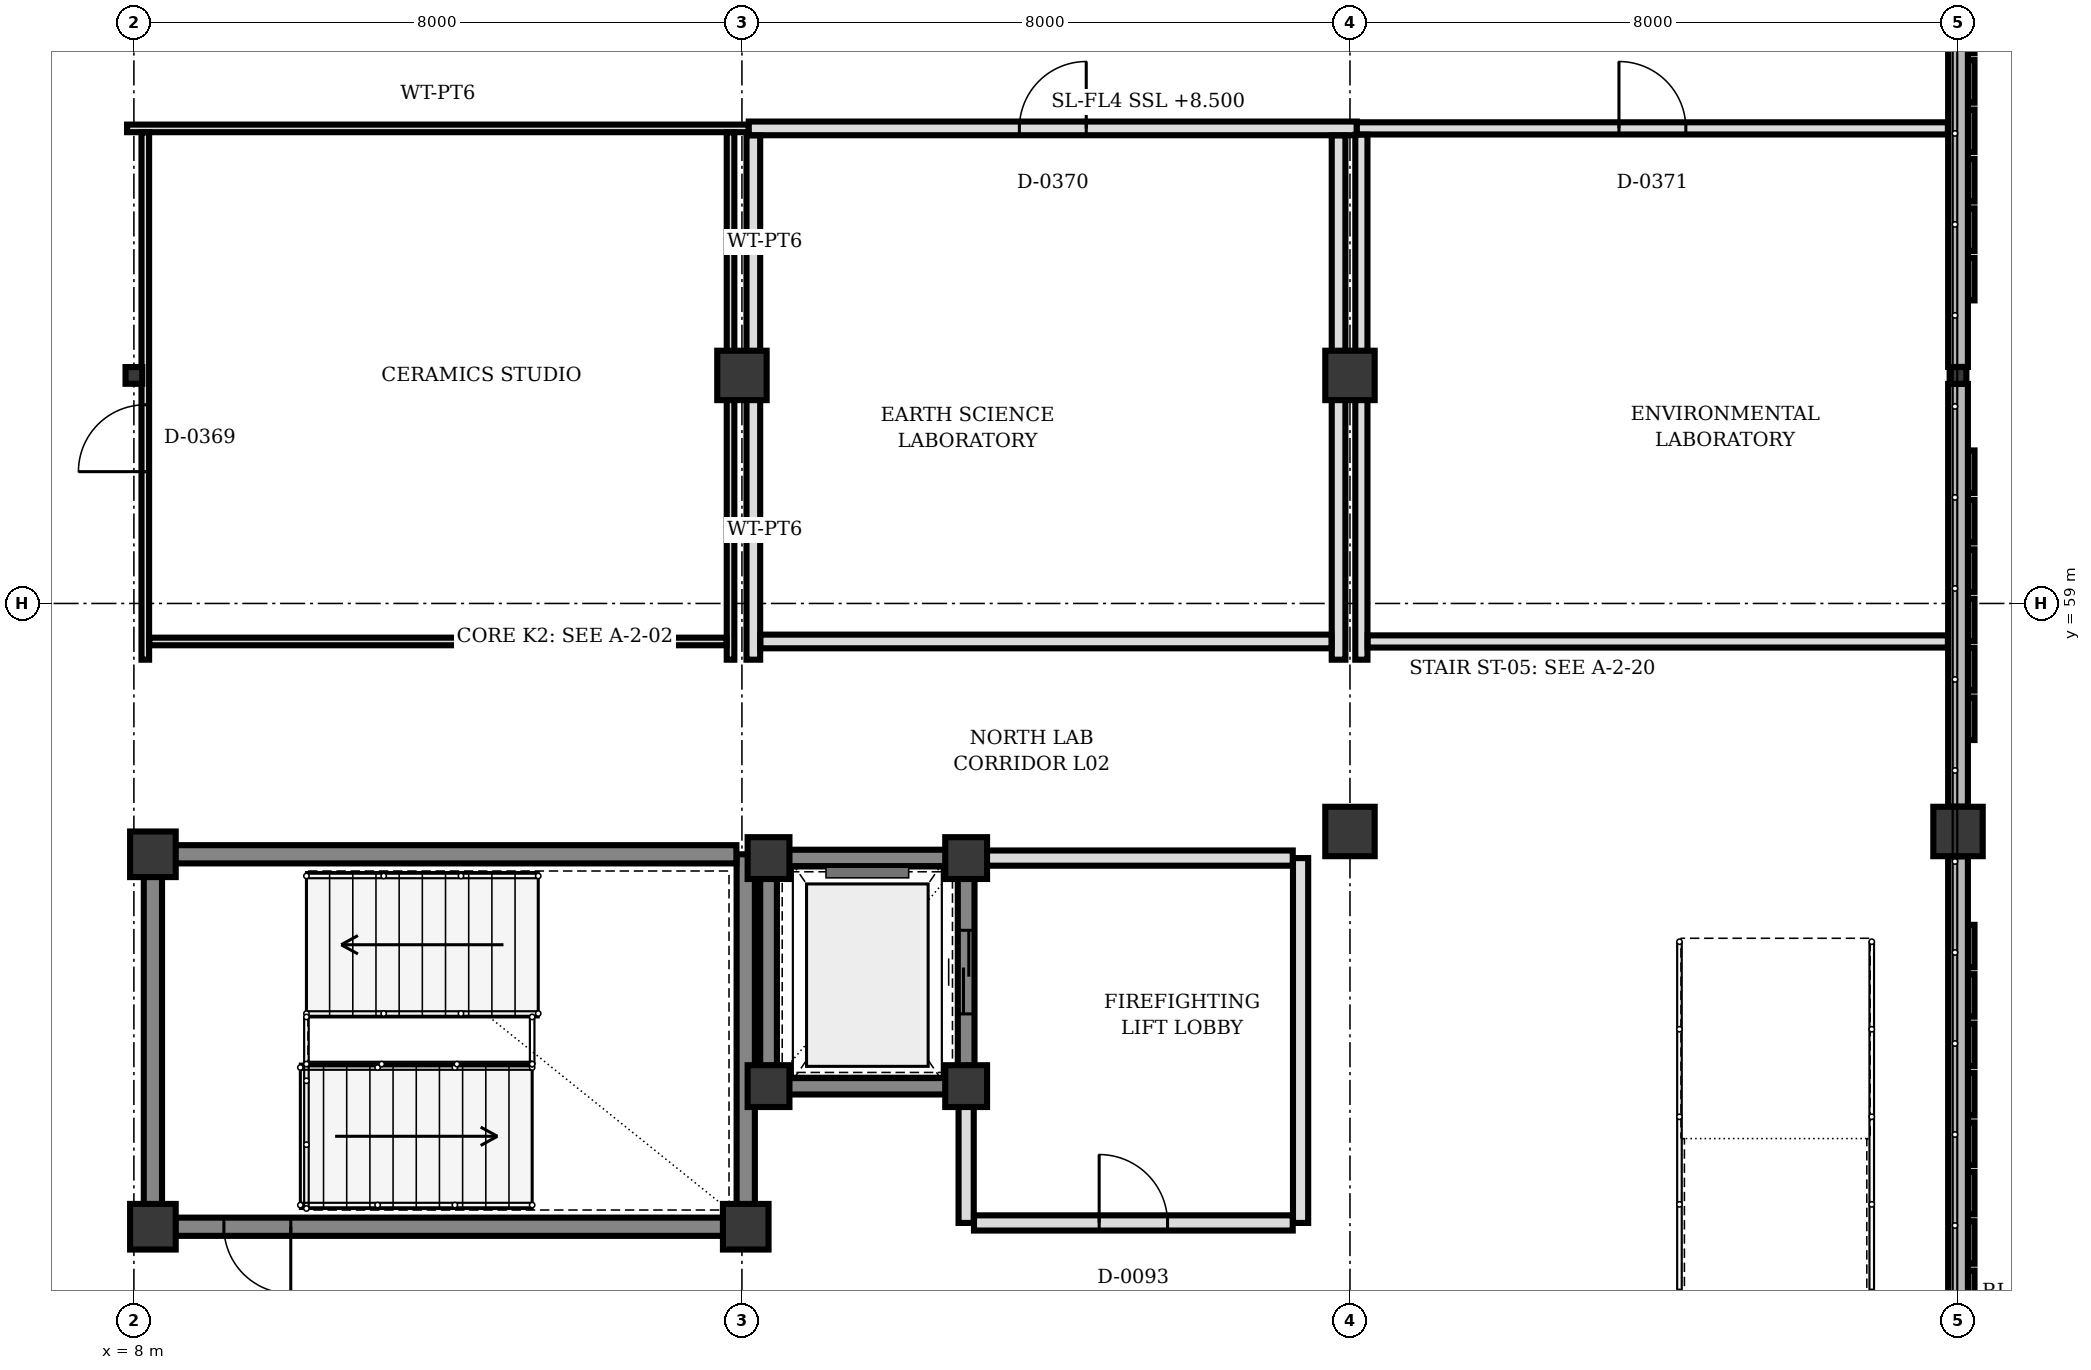
"""IFC4 building model, lengths in metres.
Left out: names, types, materials, properties, quantities, classifications, styles, units other than length and angle.
Written with IfcOpenShell. Run it as: python <this file> out.ifc"""

import sys

from ifc_helpers import new_model, si_unit, direction, frame, frame_2d, origin, origin_2d, place, context, subcontext, project, spatial, rectangle, hollow_rectangle, extrude, element, fill, save


model = new_model("IFC4")
c1 = context("Model", 3, precision=1e-05, world=origin(), true_north=direction((0.0, 1.0)))
c2 = subcontext(c1, "Body", "Model", "MODEL_VIEW")
j1 = project(units=[si_unit("LENGTHUNIT", "METRE"), si_unit("PLANEANGLEUNIT", "RADIAN")], contexts=[c1])
p1 = place(None, origin())
s1 = spatial("IfcSite", under=j1, at=p1, CompositionType="ELEMENT")
p2 = place(p1, origin())
s2 = spatial("IfcBuilding", under=s1, at=p2, CompositionType="ELEMENT")
p3 = place(p2, frame((0.0, 0.0, 8.5)))
s3 = spatial("IfcBuildingStorey", under=s2, at=p3, CompositionType="ELEMENT", Elevation=8.5)
for number, where, z_axis, x_axis in (
    (1, (8.25, 50.8, 0.0), (0.0, 0.0, 1.0), (1.0, 0.0, 0.0)),
    (2, (16.05, 50.8, 0.0), (0.0, 0.0, 1.0), (1.0, 0.0, 0.0)),
    (3, (8.25, 55.7, 0.0), (0.0, 0.0, 1.0), (1.0, 0.0, 0.0)),
):
    element("IfcColumn", number, at=place(p3, frame(where, z_axis=z_axis, x_axis=x_axis)), inside=s3, PredefinedType="COLUMN", context=c2, shape_type="SweptSolid", body=[
        extrude(rectangle(XDim=0.6, YDim=0.6, at=origin_2d()), origin(), (0.0, 0.0, 1.0), 4.0),
    ])
for number, where, z_axis, x_axis in (
    (4, (16.35, 52.65, 0.0), (0.0, 0.0, 1.0), (1.0, 0.0, 0.0)),
    (5, (18.95, 52.65, 0.0), (0.0, 0.0, 1.0), (1.0, 0.0, 0.0)),
    (6, (18.95, 55.65, 0.0), (0.0, 0.0, 1.0), (1.0, 0.0, 0.0)),
    (7, (16.35, 55.65, 0.0), (0.0, 0.0, 1.0), (1.0, 0.0, 0.0)),
):
    element("IfcColumn", number, at=place(p3, frame(where, z_axis=z_axis, x_axis=x_axis)), inside=s3, PredefinedType="COLUMN", context=c2, shape_type="SweptSolid", body=[
        extrude(rectangle(XDim=0.55, YDim=0.55, at=origin_2d()), origin(), (0.0, 0.0, 1.0), 4.0),
    ])
for number, where, z_axis, x_axis in (
    (8, (16.0, 62.0, 0.0), (0.0, 0.0, 1.0), (1.0, 0.0, 0.0)),
    (9, (24.0, 56.0, 0.0), (0.0, 0.0, 1.0), (1.0, 0.0, 0.0)),
    (10, (24.0, 62.0, 0.0), (0.0, 0.0, 1.0), (1.0, 0.0, 0.0)),
    (11, (32.0, 56.0, 0.0), (0.0, 0.0, 1.0), (1.0, 0.0, 0.0)),
):
    element("IfcColumn", number, at=place(p3, frame(where, z_axis=z_axis, x_axis=x_axis)), inside=s3, PredefinedType="COLUMN", context=c2, shape_type="SweptSolid", body=[
        extrude(rectangle(XDim=0.65, YDim=0.65, at=origin_2d()), origin(), (0.0, 0.0, 1.0), 4.0),
    ])
for number, where, z_axis, x_axis in (
    (12, (32.0, 62.0, 0.0), (0.0, 0.0, 1.0), (1.0, 0.0, 0.0)),
    (13, (8.0, 62.0, 0.0), (0.0, 0.0, 1.0), (1.0, 0.0, 0.0)),
):
    element("IfcColumn", number, at=place(p3, frame(where, z_axis=z_axis, x_axis=x_axis)), inside=s3, PredefinedType="COLUMN", context=c2, shape_type="SweptSolid", body=[
        extrude(hollow_rectangle(XDim=0.22, YDim=0.22, WallThickness=0.01, at=origin_2d()), origin(), (0.0, 0.0, 1.0), 4.0),
    ])
for number, where, z_axis, x_axis in (
    (14, (32.0, 67.673, 0.0), (0.0, 0.0, 1.0), (0.0, -1.0, 0.0)),
    (15, (32.0, 61.888, 0.0), (0.0, 0.0, 1.0), (0.0, -1.0, 0.0)),
):
    element("IfcWall", number, at=place(p3, frame(where, z_axis=z_axis, x_axis=x_axis)), inside=s3, PredefinedType="SOLIDWALL", context=c2, shape_type="SweptSolid", body=[
        extrude(rectangle(XDim=5.561, YDim=0.26, at=frame_2d((2.781, 0.0))), origin(), (0.0, 0.0, 1.0), 3.002),
    ])
p4 = place(p3, frame((32.0, 55.673, 0.0), z_axis=(0.0, 0.0, 1.0), x_axis=(0.0, -1.0, 0.0)))
e16 = element("IfcWall", 16, at=p4, inside=s3, PredefinedType="SOLIDWALL", context=c2, shape_type="SweptSolid", body=[
    extrude(rectangle(XDim=7.561, YDim=0.26, at=frame_2d((3.781, 0.0))), origin(), (0.0, 0.0, 1.0), 3.152),
])
p5 = place(p3, frame((8.25, 51.092, 0.0), z_axis=(0.0, 0.0, 1.0), x_axis=(0.0, 1.0, 0.0)))
e17 = element("IfcWall", 17, at=p5, inside=s3, PredefinedType="SHEAR", context=c2, shape_type="SweptSolid", body=[
    extrude(rectangle(XDim=4.316, YDim=0.24, at=frame_2d((2.158, 0.0))), origin(), (0.0, 0.0, 1.0), 3.74),
])
p6 = place(p3, frame((16.05, 55.7, 0.0), z_axis=(0.0, 0.0, 1.0), x_axis=(0.0, -1.0, 0.0)))
e18 = element("IfcWall", 18, at=p6, inside=s3, PredefinedType="SHEAR", context=c2, shape_type="SweptSolid", body=[
    extrude(rectangle(XDim=4.608, YDim=0.24, at=frame_2d((2.304, 0.0))), origin(), (0.0, 0.0, 1.0), 3.74),
])
p7 = place(p3, frame((15.758, 50.8, 0.0), z_axis=(0.0, 0.0, 1.0), x_axis=(-1.0, 0.0, 0.0)))
e19 = element("IfcWall", 19, at=p7, inside=s3, PredefinedType="SHEAR", context=c2, shape_type="SweptSolid", body=[
    extrude(rectangle(XDim=7.216, YDim=0.24, at=frame_2d((3.608, 0.0))), origin(), (0.0, 0.0, 1.0), 3.74),
])
p8 = place(p7, frame((5.694, 0.0, 0.0)))
e20 = element("IfcOpeningElement", 20, at=p8, cuts=e19, PredefinedType="OPENING", context=c2, shape_type="SweptSolid", body=[
    extrude(rectangle(XDim=0.88, YDim=2.1, at=frame_2d((0.44, 1.05))), frame((0.0, 0.13, 0.0), z_axis=(0.0, -1.0, 0.0), x_axis=(1.0, 0.0, 0.0)), (0.0, 0.0, 1.0), 0.26),
])
p9 = place(p3, frame((15.927, 55.7, 0.0), z_axis=(0.0, 0.0, 1.0), x_axis=(-1.0, 0.0, 0.0)))
e21 = element("IfcWall", 21, at=p9, inside=s3, PredefinedType="SHEAR", context=c2, shape_type="SweptSolid", body=[
    extrude(rectangle(XDim=7.385, YDim=0.24, at=frame_2d((3.692, 0.0))), origin(), (0.0, 0.0, 1.0), 3.74),
])
p10 = place(p3, frame((16.617, 52.65, 0.0), z_axis=(0.0, 0.0, 1.0), x_axis=(1.0, 0.0, 0.0)))
e22 = element("IfcWall", 22, at=p10, inside=s3, PredefinedType="SHEAR", context=c2, shape_type="SweptSolid", body=[
    extrude(rectangle(XDim=2.066, YDim=0.22, at=frame_2d((1.033, 0.0))), origin(), (0.0, 0.0, 1.0), 3.74),
])
p11 = place(p3, frame((18.95, 52.917, 0.0), z_axis=(0.0, 0.0, 1.0), x_axis=(0.0, 1.0, 0.0)))
e23 = element("IfcWall", 23, at=p11, inside=s3, PredefinedType="SHEAR", context=c2, shape_type="SweptSolid", body=[
    extrude(rectangle(XDim=2.466, YDim=0.22, at=frame_2d((1.233, 0.0))), origin(), (0.0, 0.0, 1.0), 3.74),
])
p12 = place(p11, frame((0.683, 0.0, 0.0)))
e24 = element("IfcOpeningElement", 24, at=p12, cuts=e23, PredefinedType="OPENING", context=c2, shape_type="SweptSolid", body=[
    extrude(rectangle(XDim=1.1, YDim=2.15, at=frame_2d((0.55, 1.075))), frame((0.0, 0.12, 0.0), z_axis=(0.0, -1.0, 0.0), x_axis=(1.0, 0.0, 0.0)), (0.0, 0.0, 1.0), 0.24),
])
p13 = place(p3, frame((18.683, 55.65, 0.0), z_axis=(0.0, 0.0, 1.0), x_axis=(-1.0, 0.0, 0.0)))
e25 = element("IfcWall", 25, at=p13, inside=s3, PredefinedType="SHEAR", context=c2, shape_type="SweptSolid", body=[
    extrude(rectangle(XDim=2.066, YDim=0.22, at=frame_2d((1.033, 0.0))), origin(), (0.0, 0.0, 1.0), 3.74),
])
p14 = place(p3, frame((16.35, 55.383, 0.0), z_axis=(0.0, 0.0, 1.0), x_axis=(0.0, -1.0, 0.0)))
e26 = element("IfcWall", 26, at=p14, inside=s3, PredefinedType="SHEAR", context=c2, shape_type="SweptSolid", body=[
    extrude(rectangle(XDim=2.466, YDim=0.22, at=frame_2d((1.233, 0.0))), origin(), (0.0, 0.0, 1.0), 3.74),
])
p15 = place(p3, frame((18.95, 50.85, 0.0), z_axis=(0.0, 0.0, 1.0), x_axis=(0.0, 1.0, 0.0)))
e27 = element("IfcWall", 27, at=p15, inside=s3, PredefinedType="PARTITIONING", context=c2, shape_type="SweptSolid", body=[
    extrude(rectangle(XDim=1.533, YDim=0.2, at=frame_2d((0.767, 0.0))), origin(), (0.0, 0.0, 1.0), 3.7),
])
p16 = place(p3, frame((23.35, 50.85, 0.0), z_axis=(0.0, 0.0, 1.0), x_axis=(0.0, 1.0, 0.0)))
e28 = element("IfcWall", 28, at=p16, inside=s3, PredefinedType="PARTITIONING", context=c2, shape_type="SweptSolid", body=[
    extrude(rectangle(XDim=4.8, YDim=0.2, at=frame_2d((2.4, 0.0))), origin(), (0.0, 0.0, 1.0), 3.7),
])
p17 = place(p3, frame((19.217, 55.65, 0.0), z_axis=(0.0, 0.0, 1.0), x_axis=(1.0, 0.0, 0.0)))
e29 = element("IfcWall", 29, at=p17, inside=s3, PredefinedType="PARTITIONING", context=c2, shape_type="SweptSolid", body=[
    extrude(rectangle(XDim=4.03, YDim=0.2, at=frame_2d((2.015, 0.0))), origin(), (0.0, 0.0, 1.0), 3.7),
])
p18 = place(p3, frame((19.053, 50.85, 0.0), z_axis=(0.0, 0.0, 1.0), x_axis=(1.0, 0.0, 0.0)))
e30 = element("IfcWall", 30, at=p18, inside=s3, PredefinedType="PARTITIONING", context=c2, shape_type="SweptSolid", body=[
    extrude(rectangle(XDim=4.194, YDim=0.2, at=frame_2d((2.097, 0.0))), origin(), (0.0, 0.0, 1.0), 3.7),
])
p19 = place(p18, frame((1.647, 0.0, 0.0)))
e31 = element("IfcOpeningElement", 31, at=p19, cuts=e30, PredefinedType="OPENING", context=c2, shape_type="SweptSolid", body=[
    extrude(rectangle(XDim=0.9, YDim=2.2, at=frame_2d((0.45, 1.1))), frame((0.0, 0.11, 0.0), z_axis=(0.0, -1.0, 0.0), x_axis=(1.0, 0.0, 0.0)), (0.0, 0.0, 1.0), 0.22),
])
p20 = place(p3, frame((7.91, 65.25, 0.0), z_axis=(0.0, 0.0, 1.0), x_axis=(1.0, 0.0, 0.0)))
e32 = element("IfcWall", 32, at=p20, inside=s3, PredefinedType="PARTITIONING", context=c2, shape_type="SweptSolid", body=[
    extrude(rectangle(XDim=8.18, YDim=0.1, at=frame_2d((4.09, 0.0))), origin(), (0.0, 0.0, 1.0), 3.152),
])
p21 = place(p3, frame((15.85, 65.197, 0.0), z_axis=(0.0, 0.0, 1.0), x_axis=(0.0, -1.0, 0.0)))
e33 = element("IfcWall", 33, at=p21, inside=s3, PredefinedType="PARTITIONING", context=c2, shape_type="SweptSolid", body=[
    extrude(rectangle(XDim=2.88, YDim=0.1, at=frame_2d((1.44, 0.0))), origin(), (0.0, 0.0, 1.0), 3.002),
])
p22 = place(p3, frame((15.85, 61.683, 0.0), z_axis=(0.0, 0.0, 1.0), x_axis=(0.0, -1.0, 0.0)))
e34 = element("IfcWall", 34, at=p22, inside=s3, PredefinedType="PARTITIONING", context=c2, shape_type="SweptSolid", body=[
    extrude(rectangle(XDim=3.423, YDim=0.1, at=frame_2d((1.711, 0.0))), origin(), (0.0, 0.0, 1.0), 3.002),
])
p23 = place(p3, frame((8.15, 58.26, 0.0), z_axis=(0.0, 0.0, 1.0), x_axis=(0.0, 1.0, 0.0)))
e35 = element("IfcWall", 35, at=p23, inside=s3, PredefinedType="PARTITIONING", context=c2, shape_type="SweptSolid", body=[
    extrude(rectangle(XDim=6.937, YDim=0.1, at=frame_2d((3.469, 0.0))), origin(), (0.0, 0.0, 1.0), 3.002),
])
p24 = place(p23, frame((2.474, 0.0, 0.0)))
e36 = element("IfcOpeningElement", 36, at=p24, cuts=e35, PredefinedType="OPENING", context=c2, shape_type="SweptSolid", body=[
    extrude(rectangle(XDim=0.88, YDim=2.1, at=frame_2d((0.44, 1.05))), frame((0.0, 0.06, 0.0), z_axis=(0.0, -1.0, 0.0), x_axis=(1.0, 0.0, 0.0)), (0.0, 0.0, 1.0), 0.12),
])
p25 = place(p3, frame((15.797, 58.5, 0.0), z_axis=(0.0, 0.0, 1.0), x_axis=(-1.0, 0.0, 0.0)))
e37 = element("IfcWall", 37, at=p25, inside=s3, PredefinedType="PARTITIONING", context=c2, shape_type="SweptSolid", body=[
    extrude(rectangle(XDim=7.594, YDim=0.1, at=frame_2d((3.797, 0.0))), origin(), (0.0, 0.0, 1.0), 3.7),
])
p26 = place(p3, frame((16.09, 65.25, 0.0), z_axis=(0.0, 0.0, 1.0), x_axis=(1.0, 0.0, 0.0)))
e38 = element("IfcWall", 38, at=p26, inside=s3, PredefinedType="PARTITIONING", context=c2, shape_type="SweptSolid", body=[
    extrude(rectangle(XDim=8.0, YDim=0.18, at=frame_2d((4.0, 0.0))), origin(), (0.0, 0.0, 1.0), 3.152),
])
p27 = place(p26, frame((3.56, 0.0, 0.0)))
e39 = element("IfcOpeningElement", 39, at=p27, cuts=e38, PredefinedType="OPENING", context=c2, shape_type="SweptSolid", body=[
    extrude(rectangle(XDim=0.88, YDim=2.1, at=frame_2d((0.44, 1.05))), frame((0.0, 0.1, 0.0), z_axis=(0.0, -1.0, 0.0), x_axis=(1.0, 0.0, 0.0)), (0.0, 0.0, 1.0), 0.2),
])
p28 = place(p3, frame((23.85, 65.157, 0.0), z_axis=(0.0, 0.0, 1.0), x_axis=(0.0, -1.0, 0.0)))
e40 = element("IfcWall", 40, at=p28, inside=s3, PredefinedType="PARTITIONING", context=c2, shape_type="SweptSolid", body=[
    extrude(rectangle(XDim=2.84, YDim=0.18, at=frame_2d((1.42, 0.0))), origin(), (0.0, 0.0, 1.0), 3.002),
])
for number, where, z_axis, x_axis in (
    (41, (23.85, 61.683, 0.0), (0.0, 0.0, 1.0), (0.0, -1.0, 0.0)),
    (42, (16.15, 58.26, 0.0), (0.0, 0.0, 1.0), (0.0, 1.0, 0.0)),
):
    element("IfcWall", number, at=place(p3, frame(where, z_axis=z_axis, x_axis=x_axis)), inside=s3, PredefinedType="PARTITIONING", context=c2, shape_type="SweptSolid", body=[
        extrude(rectangle(XDim=3.423, YDim=0.18, at=frame_2d((1.711, 0.0))), origin(), (0.0, 0.0, 1.0), 3.002),
    ])
p29 = place(p3, frame((16.15, 62.317, 0.0), z_axis=(0.0, 0.0, 1.0), x_axis=(0.0, 1.0, 0.0)))
e43 = element("IfcWall", 43, at=p29, inside=s3, PredefinedType="PARTITIONING", context=c2, shape_type="SweptSolid", body=[
    extrude(rectangle(XDim=2.84, YDim=0.18, at=frame_2d((1.42, 0.0))), origin(), (0.0, 0.0, 1.0), 3.002),
])
p30 = place(p3, frame((23.757, 58.5, 0.0), z_axis=(0.0, 0.0, 1.0), x_axis=(-1.0, 0.0, 0.0)))
e44 = element("IfcWall", 44, at=p30, inside=s3, PredefinedType="PARTITIONING", context=c2, shape_type="SweptSolid", body=[
    extrude(rectangle(XDim=7.514, YDim=0.18, at=frame_2d((3.757, 0.0))), origin(), (0.0, 0.0, 1.0), 3.152),
])
p31 = place(p3, frame((24.09, 65.25, 0.0), z_axis=(0.0, 0.0, 1.0), x_axis=(1.0, 0.0, 0.0)))
e45 = element("IfcWall", 45, at=p31, inside=s3, PredefinedType="PARTITIONING", context=c2, shape_type="SweptSolid", body=[
    extrude(rectangle(XDim=7.777, YDim=0.16, at=frame_2d((3.888, 0.0))), origin(), (0.0, 0.0, 1.0), 3.152),
])
p32 = place(p31, frame((3.449, 0.0, 0.0)))
e46 = element("IfcOpeningElement", 46, at=p32, cuts=e45, PredefinedType="OPENING", context=c2, shape_type="SweptSolid", body=[
    extrude(rectangle(XDim=0.88, YDim=2.1, at=frame_2d((0.44, 1.05))), frame((0.0, 0.09, 0.0), z_axis=(0.0, -1.0, 0.0), x_axis=(1.0, 0.0, 0.0)), (0.0, 0.0, 1.0), 0.18),
])
p33 = place(p3, frame((24.15, 58.26, 0.0), z_axis=(0.0, 0.0, 1.0), x_axis=(0.0, 1.0, 0.0)))
e47 = element("IfcWall", 47, at=p33, inside=s3, PredefinedType="PARTITIONING", context=c2, shape_type="SweptSolid", body=[
    extrude(rectangle(XDim=3.423, YDim=0.16, at=frame_2d((1.711, 0.0))), origin(), (0.0, 0.0, 1.0), 3.002),
])
p34 = place(p3, frame((24.15, 62.317, 0.0), z_axis=(0.0, 0.0, 1.0), x_axis=(0.0, 1.0, 0.0)))
e48 = element("IfcWall", 48, at=p34, inside=s3, PredefinedType="PARTITIONING", context=c2, shape_type="SweptSolid", body=[
    extrude(rectangle(XDim=2.85, YDim=0.16, at=frame_2d((1.425, 0.0))), origin(), (0.0, 0.0, 1.0), 3.002),
])
p35 = place(p3, frame((31.867, 58.5, 0.0), z_axis=(0.0, 0.0, 1.0), x_axis=(-1.0, 0.0, 0.0)))
e49 = element("IfcWall", 49, at=p35, inside=s3, PredefinedType="PARTITIONING", context=c2, shape_type="SweptSolid", body=[
    extrude(rectangle(XDim=7.634, YDim=0.16, at=frame_2d((3.817, 0.0))), origin(), (0.0, 0.0, 1.0), 3.152),
])
p36 = place(p8, origin())
e50 = element("IfcDoor", 50, at=p36, inside=s3, OperationType="SINGLE_SWING_LEFT", PredefinedType="DOOR", context=c2, shape_type="SweptSolid", body=[
    extrude(rectangle(XDim=0.88, YDim=2.1, at=frame_2d((0.44, 1.05))), frame((0.0, 0.025, 0.0), z_axis=(0.0, -1.0, 0.0), x_axis=(1.0, 0.0, 0.0)), (0.0, 0.0, 1.0), 0.05),
])
fill(e20, e50)
p37 = place(p12, origin())
e51 = element("IfcDoor", 51, at=p37, inside=s3, OperationType="DOUBLE_DOOR_SLIDING", PredefinedType="DOOR", context=c2, shape_type="SweptSolid", body=[
    extrude(rectangle(XDim=1.1, YDim=2.15, at=frame_2d((0.55, 1.075))), frame((0.0, 0.025, 0.0), z_axis=(0.0, -1.0, 0.0), x_axis=(1.0, 0.0, 0.0)), (0.0, 0.0, 1.0), 0.05),
])
fill(e24, e51)
p38 = place(p19, origin())
e52 = element("IfcDoor", 52, at=p38, inside=s3, OperationType="SINGLE_SWING_LEFT", PredefinedType="DOOR", context=c2, shape_type="SweptSolid", body=[
    extrude(rectangle(XDim=0.9, YDim=2.2, at=frame_2d((0.45, 1.1))), frame((0.0, 0.025, 0.0), z_axis=(0.0, -1.0, 0.0), x_axis=(1.0, 0.0, 0.0)), (0.0, 0.0, 1.0), 0.05),
])
fill(e31, e52)
p39 = place(p24, origin())
e53 = element("IfcDoor", 53, at=p39, inside=s3, OperationType="SINGLE_SWING_LEFT", PredefinedType="DOOR", context=c2, shape_type="SweptSolid", body=[
    extrude(rectangle(XDim=0.88, YDim=2.1, at=frame_2d((0.44, 1.05))), frame((0.0, 0.025, 0.0), z_axis=(0.0, -1.0, 0.0), x_axis=(1.0, 0.0, 0.0)), (0.0, 0.0, 1.0), 0.05),
])
fill(e36, e53)
p40 = place(p27, origin())
e54 = element("IfcDoor", 54, at=p40, inside=s3, OperationType="SINGLE_SWING_RIGHT", PredefinedType="DOOR", context=c2, shape_type="SweptSolid", body=[
    extrude(rectangle(XDim=0.88, YDim=2.1, at=frame_2d((0.44, 1.05))), frame((0.0, 0.025, 0.0), z_axis=(0.0, -1.0, 0.0), x_axis=(1.0, 0.0, 0.0)), (0.0, 0.0, 1.0), 0.05),
])
fill(e39, e54)
p41 = place(p32, origin())
e55 = element("IfcDoor", 55, at=p41, inside=s3, OperationType="SINGLE_SWING_LEFT", PredefinedType="DOOR", context=c2, shape_type="SweptSolid", body=[
    extrude(rectangle(XDim=0.88, YDim=2.1, at=frame_2d((0.44, 1.05))), frame((0.0, 0.025, 0.0), z_axis=(0.0, -1.0, 0.0), x_axis=(1.0, 0.0, 0.0)), (0.0, 0.0, 1.0), 0.05),
])
fill(e46, e55)
save(model, sys.argv[1])
